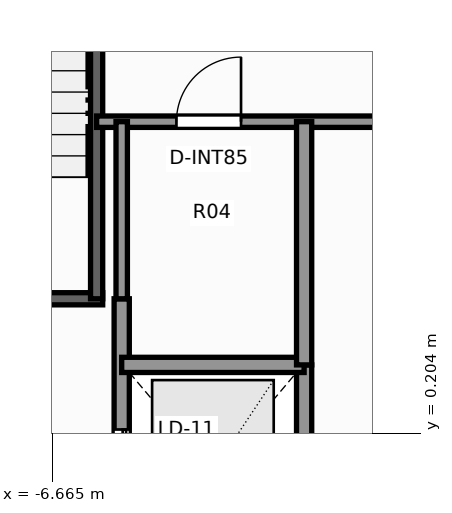
"""IFC4 building model, lengths in metres.
Left out: names, types, materials, properties, quantities, classifications, styles, units other than length and angle.
Written with IfcOpenShell. Run it as: python <this file> out.ifc"""

import sys

from ifc_helpers import new_model, si_unit, direction, frame, frame_2d, origin, place, context, subcontext, project, spatial, rectangle, extrude, element, fill, save


model = new_model("IFC4")
c1 = context("Model", 3, precision=1e-05, world=origin(), true_north=direction((0.0, 1.0)))
c2 = subcontext(c1, "Body", "Model", "MODEL_VIEW")
j1 = project(units=[si_unit("LENGTHUNIT", "METRE"), si_unit("PLANEANGLEUNIT", "RADIAN")], contexts=[c1])
p1 = place(None, origin())
s1 = spatial("IfcSite", under=j1, at=p1, CompositionType="ELEMENT")
p2 = place(p1, origin())
s2 = spatial("IfcBuilding", under=s1, at=p2, CompositionType="ELEMENT")
p3 = place(p2, frame((0.0, 0.0, 203.1)))
s3 = spatial("IfcBuildingStorey", under=s2, at=p3, CompositionType="ELEMENT", Elevation=203.1)
p4 = place(p3, frame((-9.52, 1.97, 0.0), z_axis=(0.0, 0.0, 1.0), x_axis=(1.0, 0.0, 0.0)))
e1 = element("IfcWall", 1, at=p4, inside=s3, PredefinedType="SHEAR", context=c2, shape_type="SweptSolid", body=[
    extrude(rectangle(XDim=3.52, YDim=0.16, at=frame_2d((1.76, 0.0))), origin(), (0.0, 0.0, 1.0), 3.3),
])
p5 = place(p4, frame((1.15, 0.0, 0.0)))
e2 = element("IfcOpeningElement", 2, at=p5, cuts=e1, PredefinedType="OPENING", context=c2, shape_type="SweptSolid", body=[
    extrude(rectangle(XDim=1.1, YDim=2.2, at=frame_2d((0.55, 1.1))), frame((0.0, 0.09, 0.0), z_axis=(0.0, -1.0, 0.0), x_axis=(1.0, 0.0, 0.0)), (0.0, 0.0, 1.0), 0.18),
])
p6 = place(p3, frame((-6.08, 1.97, 0.0), z_axis=(0.0, 0.0, 1.0), x_axis=(0.0, 1.0, 0.0)))
e3 = element("IfcWall", 3, at=p6, inside=s3, PredefinedType="SHEAR", context=c2, shape_type="SweptSolid", body=[
    extrude(rectangle(XDim=7.56, YDim=0.16, at=frame_2d((3.78, 0.0))), origin(), (0.0, 0.0, 1.0), 3.3),
])
p7 = place(p3, frame((-5.75, -3.6, 0.0), z_axis=(0.0, 0.0, 1.0), x_axis=(0.0, 1.0, 0.0)))
e4 = element("IfcWall", 4, at=p7, inside=s3, PredefinedType="SOLIDWALL", context=c2, shape_type="SweptSolid", body=[
    extrude(rectangle(XDim=5.57, YDim=0.2, at=frame_2d((2.785, 0.0))), origin(), (0.0, 0.0, 1.0), 3.08),
])
p8 = place(p7, frame((2.75, 0.0, 0.0)))
e5 = element("IfcOpeningElement", 5, at=p8, cuts=e4, PredefinedType="OPENING", context=c2, shape_type="SweptSolid", body=[
    extrude(rectangle(XDim=1.1, YDim=2.2, at=frame_2d((0.55, 1.1))), frame((0.0, 0.11, 0.0), z_axis=(0.0, -1.0, 0.0), x_axis=(1.0, 0.0, 0.0)), (0.0, 0.0, 1.0), 0.22),
])
p9 = place(p3, frame((-3.35, -1.7, 0.0), z_axis=(0.0, 0.0, 1.0), x_axis=(0.0, 1.0, 0.0)))
e6 = element("IfcWall", 6, at=p9, inside=s3, PredefinedType="SOLIDWALL", context=c2, shape_type="SweptSolid", body=[
    extrude(rectangle(XDim=2.8, YDim=0.2, at=frame_2d((1.4, 0.0))), origin(), (0.0, 0.0, 1.0), 3.08),
])
p10 = place(p3, frame((-5.75, 1.1, 0.0), z_axis=(0.0, 0.0, 1.0), x_axis=(1.0, 0.0, 0.0)))
e7 = element("IfcWall", 7, at=p10, inside=s3, PredefinedType="SOLIDWALL", context=c2, shape_type="SweptSolid", body=[
    extrude(rectangle(XDim=2.4, YDim=0.2, at=frame_2d((1.2, 0.0))), origin(), (0.0, 0.0, 1.0), 3.08),
])
p11 = place(p3, frame((-6.08, 4.3, 0.0), z_axis=(0.0, 0.0, 1.0), x_axis=(1.0, 0.0, 0.0)))
e8 = element("IfcWall", 8, at=p11, inside=s3, PredefinedType="PARTITIONING", context=c2, shape_type="SweptSolid", body=[
    extrude(rectangle(XDim=6.3, YDim=0.15, at=frame_2d((3.15, 0.0))), origin(), (0.0, 0.0, 1.0), 3.08),
])
p12 = place(p11, frame((1.05, 0.0, 0.0)))
e9 = element("IfcOpeningElement", 9, at=p12, cuts=e8, PredefinedType="OPENING", context=c2, shape_type="SweptSolid", body=[
    extrude(rectangle(XDim=0.85, YDim=2.03, at=frame_2d((0.425, 1.015))), frame((0.0, 0.085, 0.0), z_axis=(0.0, -1.0, 0.0), x_axis=(1.0, 0.0, 0.0)), (0.0, 0.0, 1.0), 0.17),
])
p13 = place(p3, frame((-3.35, 1.1, 0.0), z_axis=(0.0, 0.0, 1.0), x_axis=(0.0, 1.0, 0.0)))
e10 = element("IfcWall", 10, at=p13, inside=s3, PredefinedType="SOLIDWALL", context=c2, shape_type="SweptSolid", body=[
    extrude(rectangle(XDim=3.2, YDim=0.2, at=frame_2d((1.6, 0.0))), origin(), (0.0, 0.0, 1.0), 3.08),
])
p14 = place(p3, frame((-5.75, 1.97, 0.0), z_axis=(0.0, 0.0, 1.0), x_axis=(0.0, 1.0, 0.0)))
e11 = element("IfcWall", 11, at=p14, inside=s3, PredefinedType="PARTITIONING", context=c2, shape_type="SweptSolid", body=[
    extrude(rectangle(XDim=2.33, YDim=0.15, at=frame_2d((1.165, 0.0))), origin(), (0.0, 0.0, 1.0), 3.08),
])
p15 = place(p8, origin())
e12 = element("IfcDoor", 12, at=p15, inside=s3, OperationType="DOUBLE_DOOR_SLIDING", PredefinedType="DOOR", context=c2, shape_type="SweptSolid", body=[
    extrude(rectangle(XDim=1.1, YDim=2.2, at=frame_2d((0.55, 1.1))), frame((0.0, 0.025, 0.0), z_axis=(0.0, -1.0, 0.0), x_axis=(1.0, 0.0, 0.0)), (0.0, 0.0, 1.0), 0.05),
])
fill(e5, e12)
p16 = place(p12, origin())
e13 = element("IfcDoor", 13, at=p16, inside=s3, OperationType="SINGLE_SWING_RIGHT", PredefinedType="DOOR", context=c2, shape_type="SweptSolid", body=[
    extrude(rectangle(XDim=0.85, YDim=2.03, at=frame_2d((0.425, 1.015))), frame((0.0, 0.025, 0.0), z_axis=(0.0, -1.0, 0.0), x_axis=(1.0, 0.0, 0.0)), (0.0, 0.0, 1.0), 0.05),
])
fill(e9, e13)
save(model, sys.argv[1])
